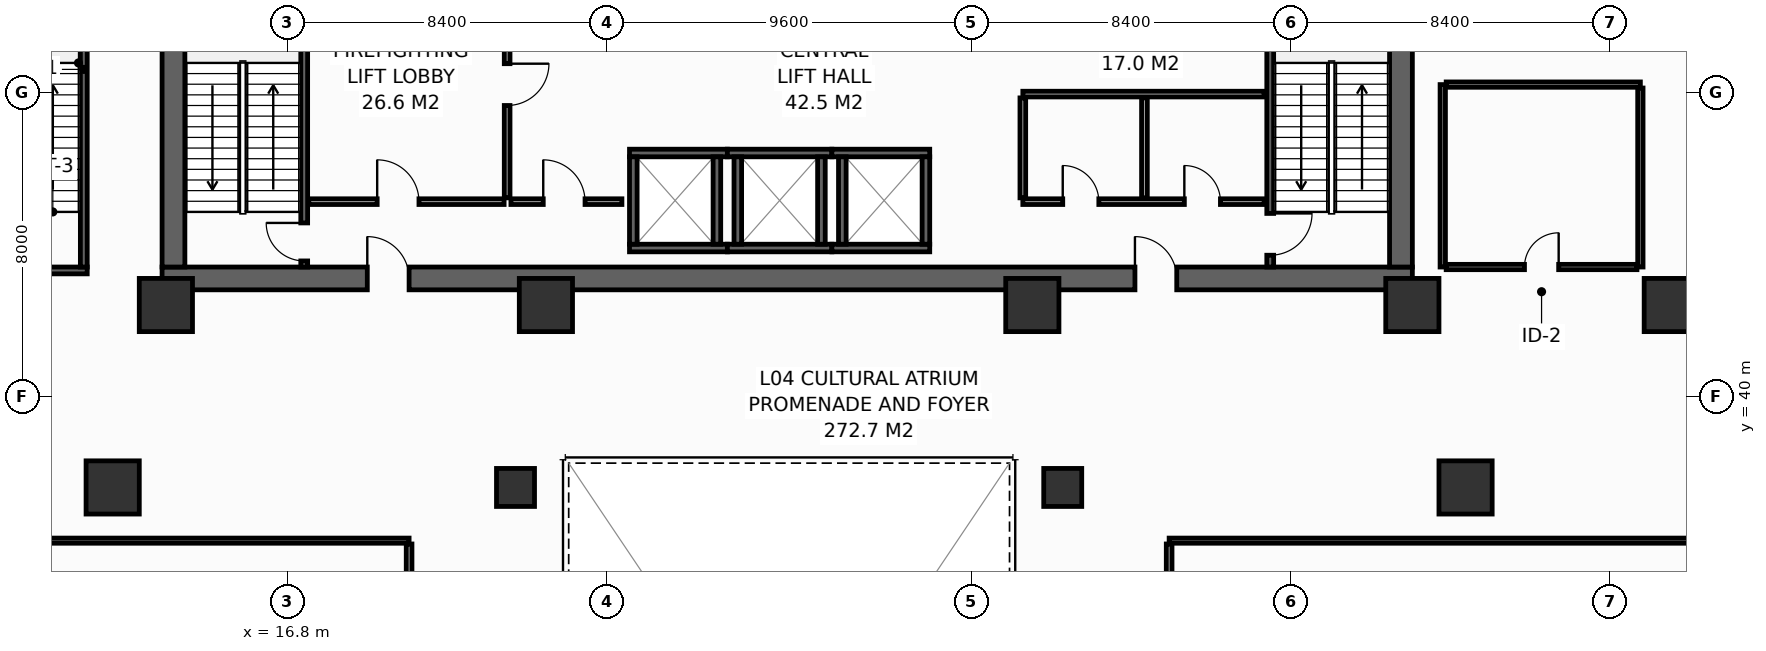
"""IFC4 building model, lengths in metres.
Left out: names, types, materials, properties, quantities, classifications, styles, units other than length and angle.
Written with IfcOpenShell. Run it as: python <this file> out.ifc"""

import sys

from ifc_helpers import new_model, si_unit, direction, frame, frame_2d, origin, origin_2d, place, context, subcontext, project, spatial, rectangle, hollow_rectangle, extrude, element, fill, save


model = new_model("IFC4")
c1 = context("Model", 3, precision=1e-05, world=origin(), true_north=direction((0.0, 1.0)))
c2 = subcontext(c1, "Body", "Model", "MODEL_VIEW")
j1 = project(units=[si_unit("LENGTHUNIT", "METRE"), si_unit("PLANEANGLEUNIT", "RADIAN")], contexts=[c1])
p1 = place(None, origin())
s1 = spatial("IfcSite", under=j1, at=p1, CompositionType="ELEMENT")
p2 = place(p1, origin())
s2 = spatial("IfcBuilding", under=s1, at=p2, CompositionType="ELEMENT")
p3 = place(p2, frame((0.0, 0.0, 22.2)))
s3 = spatial("IfcBuildingStorey", under=s2, at=p3, CompositionType="ELEMENT", Elevation=22.2)
p4 = place(p3, frame((13.5, 43.1, 0.0), z_axis=(0.0, 0.0, 1.0), x_axis=(1.0, 0.0, 0.0)))
e1 = element("IfcWall", 1, at=p4, inside=s3, PredefinedType="SHEAR", context=c2, shape_type="SweptSolid", body=[
    extrude(rectangle(XDim=32.9, YDim=0.6, at=frame_2d((16.45, 0.0))), origin(), (0.0, 0.0, 1.0), 5.15),
])
p5 = place(p4, frame((5.4, 0.0, 0.0)))
e2 = element("IfcOpeningElement", 2, at=p5, cuts=e1, PredefinedType="OPENING", context=c2, shape_type="SweptSolid", body=[
    extrude(rectangle(XDim=1.1, YDim=2.15, at=frame_2d((0.55, 1.075))), frame((0.0, 0.31, 0.0), z_axis=(0.0, -1.0, 0.0), x_axis=(1.0, 0.0, 0.0)), (0.0, 0.0, 1.0), 0.62),
])
p6 = place(p4, frame((25.6, 0.0, 0.0)))
e3 = element("IfcOpeningElement", 3, at=p6, cuts=e1, PredefinedType="OPENING", context=c2, shape_type="SweptSolid", body=[
    extrude(rectangle(XDim=1.1, YDim=2.15, at=frame_2d((0.55, 1.075))), frame((0.0, 0.31, 0.0), z_axis=(0.0, -1.0, 0.0), x_axis=(1.0, 0.0, 0.0)), (0.0, 0.0, 1.0), 0.62),
])
for number, where, z_axis, x_axis in (
    (4, (13.8, 43.4, 0.0), (0.0, 0.0, 1.0), (0.0, 1.0, 0.0)),
    (5, (46.1, 43.4, 0.0), (0.0, 0.0, 1.0), (0.0, 1.0, 0.0)),
):
    element("IfcWall", number, at=place(p3, frame(where, z_axis=z_axis, x_axis=x_axis)), inside=s3, PredefinedType="SHEAR", context=c2, shape_type="SweptSolid", body=[
        extrude(rectangle(XDim=10.4, YDim=0.6, at=frame_2d((5.2, 0.0))), origin(), (0.0, 0.0, 1.0), 5.15),
    ])
for number, where, z_axis, x_axis in (
    (6, (13.6, 42.4, 0.0), (0.0, 0.0, 1.0), (1.0, 0.0, 0.0)),
    (7, (23.6, 42.4, 0.0), (0.0, 0.0, 1.0), (1.0, 0.0, 0.0)),
    (8, (36.4, 42.4, 0.0), (0.0, 0.0, 1.0), (1.0, 0.0, 0.0)),
    (9, (46.4, 42.4, 0.0), (0.0, 0.0, 1.0), (1.0, 0.0, 0.0)),
    (10, (53.2, 42.4, 0.0), (0.0, 0.0, 1.0), (1.0, 0.0, 0.0)),
    (11, (12.2, 37.6, 0.0), (0.0, 0.0, 1.0), (1.0, 0.0, 0.0)),
):
    element("IfcColumn", number, at=place(p3, frame(where, z_axis=z_axis, x_axis=x_axis)), inside=s3, PredefinedType="COLUMN", context=c2, shape_type="SweptSolid", body=[
        extrude(hollow_rectangle(XDim=1.4, YDim=1.4, WallThickness=0.065, at=origin_2d()), origin(), (0.0, 0.0, 1.0), 5.4),
    ])
for number, where, z_axis, x_axis in (
    (12, (22.8, 37.6, 0.0), (0.0, 0.0, 1.0), (1.0, 0.0, 0.0)),
    (13, (37.2, 37.6, 0.0), (0.0, 0.0, 1.0), (1.0, 0.0, 0.0)),
):
    element("IfcColumn", number, at=place(p3, frame(where, z_axis=z_axis, x_axis=x_axis)), inside=s3, PredefinedType="COLUMN", context=c2, shape_type="SweptSolid", body=[
        extrude(hollow_rectangle(XDim=1.0, YDim=1.0, WallThickness=0.045, at=origin_2d()), origin(), (0.0, 0.0, 1.0), 5.4),
    ])
p7 = place(p3, frame((47.8, 37.6, 0.0), z_axis=(0.0, 0.0, 1.0), x_axis=(1.0, 0.0, 0.0)))
e14 = element("IfcColumn", 14, at=p7, inside=s3, PredefinedType="COLUMN", context=c2, shape_type="SweptSolid", body=[
    extrude(hollow_rectangle(XDim=1.4, YDim=1.4, WallThickness=0.065, at=origin_2d()), origin(), (0.0, 0.0, 1.0), 5.4),
])
for number, where, z_axis, x_axis in (
    (15, (25.8, 43.9, 0.0), (0.0, 0.0, 1.0), (1.0, 0.0, 0.0)),
    (16, (25.8, 46.4, 0.0), (0.0, 0.0, 1.0), (1.0, 0.0, 0.0)),
):
    element("IfcWall", number, at=place(p3, frame(where, z_axis=z_axis, x_axis=x_axis)), inside=s3, PredefinedType="SHEAR", context=c2, shape_type="SweptSolid", body=[
        extrude(rectangle(XDim=2.575, YDim=0.2, at=frame_2d((1.288, 0.0))), origin(), (0.0, 0.0, 1.0), 5.15),
    ])
for number, where, z_axis, x_axis in (
    (17, (25.9, 44.0, 0.0), (0.0, 0.0, 1.0), (0.0, 1.0, 0.0)),
    (18, (28.1, 44.0, 0.0), (0.0, 0.0, 1.0), (0.0, 1.0, 0.0)),
):
    element("IfcWall", number, at=place(p3, frame(where, z_axis=z_axis, x_axis=x_axis)), inside=s3, PredefinedType="SHEAR", context=c2, shape_type="SweptSolid", body=[
        extrude(rectangle(XDim=2.3, YDim=0.2, at=frame_2d((1.15, 0.0))), origin(), (0.0, 0.0, 1.0), 5.15),
    ])
for number, where, z_axis, x_axis in (
    (19, (28.375, 43.9, 0.0), (0.0, 0.0, 1.0), (1.0, 0.0, 0.0)),
    (20, (28.375, 46.4, 0.0), (0.0, 0.0, 1.0), (1.0, 0.0, 0.0)),
):
    element("IfcWall", number, at=place(p3, frame(where, z_axis=z_axis, x_axis=x_axis)), inside=s3, PredefinedType="SHEAR", context=c2, shape_type="SweptSolid", body=[
        extrude(rectangle(XDim=2.75, YDim=0.2, at=frame_2d((1.375, 0.0))), origin(), (0.0, 0.0, 1.0), 5.15),
    ])
for number, where, z_axis, x_axis in (
    (21, (28.65, 44.0, 0.0), (0.0, 0.0, 1.0), (0.0, 1.0, 0.0)),
    (22, (30.85, 44.0, 0.0), (0.0, 0.0, 1.0), (0.0, 1.0, 0.0)),
):
    element("IfcWall", number, at=place(p3, frame(where, z_axis=z_axis, x_axis=x_axis)), inside=s3, PredefinedType="SHEAR", context=c2, shape_type="SweptSolid", body=[
        extrude(rectangle(XDim=2.3, YDim=0.2, at=frame_2d((1.15, 0.0))), origin(), (0.0, 0.0, 1.0), 5.15),
    ])
for number, where, z_axis, x_axis in (
    (23, (31.125, 43.9, 0.0), (0.0, 0.0, 1.0), (1.0, 0.0, 0.0)),
    (24, (31.125, 46.4, 0.0), (0.0, 0.0, 1.0), (1.0, 0.0, 0.0)),
):
    element("IfcWall", number, at=place(p3, frame(where, z_axis=z_axis, x_axis=x_axis)), inside=s3, PredefinedType="SHEAR", context=c2, shape_type="SweptSolid", body=[
        extrude(rectangle(XDim=2.575, YDim=0.2, at=frame_2d((1.288, 0.0))), origin(), (0.0, 0.0, 1.0), 5.15),
    ])
for number, where, z_axis, x_axis in (
    (25, (31.4, 44.0, 0.0), (0.0, 0.0, 1.0), (0.0, 1.0, 0.0)),
    (26, (33.6, 44.0, 0.0), (0.0, 0.0, 1.0), (0.0, 1.0, 0.0)),
):
    element("IfcWall", number, at=place(p3, frame(where, z_axis=z_axis, x_axis=x_axis)), inside=s3, PredefinedType="SHEAR", context=c2, shape_type="SweptSolid", body=[
        extrude(rectangle(XDim=2.3, YDim=0.2, at=frame_2d((1.15, 0.0))), origin(), (0.0, 0.0, 1.0), 5.15),
    ])
p8 = place(p3, frame((17.24, 43.4, 0.0), z_axis=(0.0, 0.0, 1.0), x_axis=(0.0, 1.0, 0.0)))
e27 = element("IfcWall", 27, at=p8, inside=s3, PredefinedType="SHEAR", context=c2, shape_type="SweptSolid", body=[
    extrude(rectangle(XDim=10.4, YDim=0.18, at=frame_2d((5.2, 0.0))), origin(), (0.0, 0.0, 1.0), 5.15),
])
p9 = place(p8, frame((0.16, 0.0, 0.0)))
e28 = element("IfcOpeningElement", 28, at=p9, cuts=e27, PredefinedType="OPENING", context=c2, shape_type="SweptSolid", body=[
    extrude(rectangle(XDim=1.0, YDim=2.15, at=frame_2d((0.5, 1.075))), frame((0.0, 0.1, 0.0), z_axis=(0.0, -1.0, 0.0), x_axis=(1.0, 0.0, 0.0)), (0.0, 0.0, 1.0), 0.2),
])
p10 = place(p3, frame((42.66, 53.8, 0.0), z_axis=(0.0, 0.0, 1.0), x_axis=(0.0, -1.0, 0.0)))
e29 = element("IfcWall", 29, at=p10, inside=s3, PredefinedType="SHEAR", context=c2, shape_type="SweptSolid", body=[
    extrude(rectangle(XDim=10.4, YDim=0.18, at=frame_2d((5.2, 0.0))), origin(), (0.0, 0.0, 1.0), 5.15),
])
p11 = place(p10, frame((8.99, 0.0, 0.0)))
e30 = element("IfcOpeningElement", 30, at=p11, cuts=e29, PredefinedType="OPENING", context=c2, shape_type="SweptSolid", body=[
    extrude(rectangle(XDim=1.1, YDim=2.15, at=frame_2d((0.55, 1.075))), frame((0.0, 0.1, 0.0), z_axis=(0.0, -1.0, 0.0), x_axis=(1.0, 0.0, 0.0)), (0.0, 0.0, 1.0), 0.2),
])
p12 = place(p3, frame((8.12, 43.31, 0.0), z_axis=(0.0, 0.0, 1.0), x_axis=(1.0, 0.0, 0.0)))
e31 = element("IfcWall", 31, at=p12, inside=s3, PredefinedType="SHEAR", context=c2, shape_type="SweptSolid", body=[
    extrude(rectangle(XDim=3.41, YDim=0.18, at=frame_2d((1.705, 0.0))), origin(), (0.0, 0.0, 1.0), 5.15),
])
p13 = place(p12, frame((1.15, 0.0, 0.0)))
e32 = element("IfcOpeningElement", 32, at=p13, cuts=e31, PredefinedType="OPENING", context=c2, shape_type="SweptSolid", body=[
    extrude(rectangle(XDim=1.1, YDim=2.15, at=frame_2d((0.55, 1.075))), frame((0.0, 0.1, 0.0), z_axis=(0.0, -1.0, 0.0), x_axis=(1.0, 0.0, 0.0)), (0.0, 0.0, 1.0), 0.2),
])
p14 = place(p3, frame((11.44, 43.4, 0.0), z_axis=(0.0, 0.0, 1.0), x_axis=(0.0, 1.0, 0.0)))
e33 = element("IfcWall", 33, at=p14, inside=s3, PredefinedType="SHEAR", context=c2, shape_type="SweptSolid", body=[
    extrude(rectangle(XDim=10.4, YDim=0.18, at=frame_2d((5.2, 0.0))), origin(), (0.0, 0.0, 1.0), 5.15),
])
p15 = place(p3, frame((17.36, 45.12, 0.0), z_axis=(0.0, 0.0, 1.0), x_axis=(1.0, 0.0, 0.0)))
e34 = element("IfcWall", 34, at=p15, inside=s3, PredefinedType="PARTITIONING", context=c2, shape_type="SweptSolid", body=[
    extrude(rectangle(XDim=5.14, YDim=0.15, at=frame_2d((2.57, 0.0))), origin(), (0.0, 0.0, 1.0), 5.15),
])
p16 = place(p15, frame((1.8, 0.0, 0.0)))
e35 = element("IfcOpeningElement", 35, at=p16, cuts=e34, PredefinedType="OPENING", context=c2, shape_type="SweptSolid", body=[
    extrude(rectangle(XDim=1.1, YDim=2.15, at=frame_2d((0.55, 1.075))), frame((0.0, 0.085, 0.0), z_axis=(0.0, -1.0, 0.0), x_axis=(1.0, 0.0, 0.0)), (0.0, 0.0, 1.0), 0.17),
])
p17 = place(p3, frame((22.58, 50.55, 0.0), z_axis=(0.0, 0.0, 1.0), x_axis=(0.0, -1.0, 0.0)))
e36 = element("IfcWall", 36, at=p17, inside=s3, PredefinedType="PARTITIONING", context=c2, shape_type="SweptSolid", body=[
    extrude(rectangle(XDim=5.33, YDim=0.15, at=frame_2d((2.665, 0.0))), origin(), (0.0, 0.0, 1.0), 5.15),
])
p18 = place(p17, frame((1.8, 0.0, 0.0)))
e37 = element("IfcOpeningElement", 37, at=p18, cuts=e36, PredefinedType="OPENING", context=c2, shape_type="SweptSolid", body=[
    extrude(rectangle(XDim=1.1, YDim=2.15, at=frame_2d((0.55, 1.075))), frame((0.0, 0.085, 0.0), z_axis=(0.0, -1.0, 0.0), x_axis=(1.0, 0.0, 0.0)), (0.0, 0.0, 1.0), 0.17),
])
p19 = place(p3, frame((22.68, 45.12, 0.0), z_axis=(0.0, 0.0, 1.0), x_axis=(1.0, 0.0, 0.0)))
e38 = element("IfcWall", 38, at=p19, inside=s3, PredefinedType="PARTITIONING", context=c2, shape_type="SweptSolid", body=[
    extrude(rectangle(XDim=2.92, YDim=0.15, at=frame_2d((1.46, 0.0))), origin(), (0.0, 0.0, 1.0), 5.15),
])
p20 = place(p19, frame((0.85, 0.0, 0.0)))
e39 = element("IfcOpeningElement", 39, at=p20, cuts=e38, PredefinedType="OPENING", context=c2, shape_type="SweptSolid", body=[
    extrude(rectangle(XDim=1.1, YDim=2.15, at=frame_2d((0.55, 1.075))), frame((0.0, 0.085, 0.0), z_axis=(0.0, -1.0, 0.0), x_axis=(1.0, 0.0, 0.0)), (0.0, 0.0, 1.0), 0.17),
])
p21 = place(p3, frame((36.15, 45.12, 0.0), z_axis=(0.0, 0.0, 1.0), x_axis=(1.0, 0.0, 0.0)))
e40 = element("IfcWall", 40, at=p21, inside=s3, PredefinedType="PARTITIONING", context=c2, shape_type="SweptSolid", body=[
    extrude(rectangle(XDim=6.35, YDim=0.15, at=frame_2d((3.175, 0.0))), origin(), (0.0, 0.0, 1.0), 5.15),
])
p22 = place(p21, frame((1.05, 0.0, 0.0)))
e41 = element("IfcOpeningElement", 41, at=p22, cuts=e40, PredefinedType="OPENING", context=c2, shape_type="SweptSolid", body=[
    extrude(rectangle(XDim=0.95, YDim=2.15, at=frame_2d((0.475, 1.075))), frame((0.0, 0.085, 0.0), z_axis=(0.0, -1.0, 0.0), x_axis=(1.0, 0.0, 0.0)), (0.0, 0.0, 1.0), 0.17),
])
p23 = place(p21, frame((4.25, 0.0, 0.0)))
e42 = element("IfcOpeningElement", 42, at=p23, cuts=e40, PredefinedType="OPENING", context=c2, shape_type="SweptSolid", body=[
    extrude(rectangle(XDim=0.95, YDim=2.15, at=frame_2d((0.475, 1.075))), frame((0.0, 0.085, 0.0), z_axis=(0.0, -1.0, 0.0), x_axis=(1.0, 0.0, 0.0)), (0.0, 0.0, 1.0), 0.17),
])
p24 = place(p3, frame((36.15, 47.95, 0.0), z_axis=(0.0, 0.0, 1.0), x_axis=(1.0, 0.0, 0.0)))
e43 = element("IfcWall", 43, at=p24, inside=s3, PredefinedType="PARTITIONING", context=c2, shape_type="SweptSolid", body=[
    extrude(rectangle(XDim=6.35, YDim=0.15, at=frame_2d((3.175, 0.0))), origin(), (0.0, 0.0, 1.0), 5.15),
])
for number, where, z_axis, x_axis in (
    (44, (36.15, 45.22, 0.0), (0.0, 0.0, 1.0), (0.0, 1.0, 0.0)),
    (45, (39.35, 45.22, 0.0), (0.0, 0.0, 1.0), (0.0, 1.0, 0.0)),
):
    element("IfcWall", number, at=place(p3, frame(where, z_axis=z_axis, x_axis=x_axis)), inside=s3, PredefinedType="PARTITIONING", context=c2, shape_type="SweptSolid", body=[
        extrude(rectangle(XDim=2.63, YDim=0.15, at=frame_2d((1.315, 0.0))), origin(), (0.0, 0.0, 1.0), 5.15),
    ])
p25 = place(p3, frame((2.295, 36.2, 0.0), z_axis=(0.0, 0.0, 1.0), x_axis=(1.0, 0.0, 0.0)))
e46 = element("IfcWall", 46, at=p25, inside=s3, PredefinedType="PARTITIONING", context=c2, shape_type="SweptSolid", body=[
    extrude(rectangle(XDim=17.705, YDim=0.135, at=frame_2d((8.853, 0.0))), origin(), (0.0, 0.0, 1.0), 4.235),
])
p26 = place(p3, frame((20.0, 27.288, 0.0), z_axis=(0.0, 0.0, 1.0), x_axis=(0.0, 1.0, 0.0)))
e47 = element("IfcWall", 47, at=p26, inside=s3, PredefinedType="PARTITIONING", context=c2, shape_type="SweptSolid", body=[
    extrude(rectangle(XDim=8.825, YDim=0.15, at=frame_2d((4.413, 0.0))), origin(), (0.0, 0.0, 1.0), 4.235),
])
p27 = place(p26, frame((3.887, 0.0, 0.0)))
e48 = element("IfcOpeningElement", 48, at=p27, cuts=e47, PredefinedType="OPENING", context=c2, shape_type="SweptSolid", body=[
    extrude(rectangle(XDim=1.05, YDim=2.15, at=frame_2d((0.525, 1.075))), frame((0.0, 0.085, 0.0), z_axis=(0.0, -1.0, 0.0), x_axis=(1.0, 0.0, 0.0)), (0.0, 0.0, 1.0), 0.17),
])
p28 = place(p3, frame((40.0, 36.2, 0.0), z_axis=(0.0, 0.0, 1.0), x_axis=(1.0, 0.0, 0.0)))
e49 = element("IfcWall", 49, at=p28, inside=s3, PredefinedType="PARTITIONING", context=c2, shape_type="SweptSolid", body=[
    extrude(rectangle(XDim=17.705, YDim=0.135, at=frame_2d((8.853, 0.0))), origin(), (0.0, 0.0, 1.0), 4.235),
])
p29 = place(p3, frame((40.0, 26.488, 0.0), z_axis=(0.0, 0.0, 1.0), x_axis=(0.0, 1.0, 0.0)))
e50 = element("IfcWall", 50, at=p29, inside=s3, PredefinedType="PARTITIONING", context=c2, shape_type="SweptSolid", body=[
    extrude(rectangle(XDim=9.625, YDim=0.15, at=frame_2d((4.812, 0.0))), origin(), (0.0, 0.0, 1.0), 4.235),
])
p30 = place(p29, frame((4.287, 0.0, 0.0)))
e51 = element("IfcOpeningElement", 51, at=p30, cuts=e50, PredefinedType="OPENING", context=c2, shape_type="SweptSolid", body=[
    extrude(rectangle(XDim=1.05, YDim=2.15, at=frame_2d((0.525, 1.075))), frame((0.0, 0.085, 0.0), z_axis=(0.0, -1.0, 0.0), x_axis=(1.0, 0.0, 0.0)), (0.0, 0.0, 1.0), 0.17),
])
p31 = place(p3, frame((47.2, 43.4, 0.0), z_axis=(0.0, 0.0, 1.0), x_axis=(0.0, 1.0, 0.0)))
e52 = element("IfcWall", 52, at=p31, inside=s3, PredefinedType="PARTITIONING", context=c2, shape_type="SweptSolid", body=[
    extrude(rectangle(XDim=4.8, YDim=0.14, at=frame_2d((2.4, 0.0))), origin(), (0.0, 0.0, 1.0), 5.15),
])
p32 = place(p3, frame((47.29, 48.2, 0.0), z_axis=(0.0, 0.0, 1.0), x_axis=(1.0, 0.0, 0.0)))
e53 = element("IfcWall", 53, at=p32, inside=s3, PredefinedType="PARTITIONING", context=c2, shape_type="SweptSolid", body=[
    extrude(rectangle(XDim=5.11, YDim=0.14, at=frame_2d((2.555, 0.0))), origin(), (0.0, 0.0, 1.0), 5.15),
])
p33 = place(p3, frame((52.4, 43.4, 0.0), z_axis=(0.0, 0.0, 1.0), x_axis=(0.0, 1.0, 0.0)))
e54 = element("IfcWall", 54, at=p33, inside=s3, PredefinedType="PARTITIONING", context=c2, shape_type="SweptSolid", body=[
    extrude(rectangle(XDim=4.71, YDim=0.14, at=frame_2d((2.355, 0.0))), origin(), (0.0, 0.0, 1.0), 5.15),
])
p34 = place(p3, frame((47.29, 43.4, 0.0), z_axis=(0.0, 0.0, 1.0), x_axis=(1.0, 0.0, 0.0)))
e55 = element("IfcWall", 55, at=p34, inside=s3, PredefinedType="PARTITIONING", context=c2, shape_type="SweptSolid", body=[
    extrude(rectangle(XDim=5.02, YDim=0.14, at=frame_2d((2.51, 0.0))), origin(), (0.0, 0.0, 1.0), 5.15),
])
p35 = place(p34, frame((2.06, 0.0, 0.0)))
e56 = element("IfcOpeningElement", 56, at=p35, cuts=e55, PredefinedType="OPENING", context=c2, shape_type="SweptSolid", body=[
    extrude(rectangle(XDim=0.9, YDim=2.1, at=frame_2d((0.45, 1.05))), frame((0.0, 0.08, 0.0), z_axis=(0.0, -1.0, 0.0), x_axis=(1.0, 0.0, 0.0)), (0.0, 0.0, 1.0), 0.16),
])
p36 = place(p9, origin())
e57 = element("IfcDoor", 57, at=p36, inside=s3, OperationType="SINGLE_SWING_RIGHT", PredefinedType="DOOR", context=c2, shape_type="SweptSolid", body=[
    extrude(rectangle(XDim=1.0, YDim=2.15, at=frame_2d((0.5, 1.075))), frame((0.0, 0.025, 0.0), z_axis=(0.0, -1.0, 0.0), x_axis=(1.0, 0.0, 0.0)), (0.0, 0.0, 1.0), 0.05),
])
fill(e28, e57)
p37 = place(p11, origin())
e58 = element("IfcDoor", 58, at=p37, inside=s3, OperationType="SINGLE_SWING_LEFT", PredefinedType="DOOR", context=c2, shape_type="SweptSolid", body=[
    extrude(rectangle(XDim=1.1, YDim=2.15, at=frame_2d((0.55, 1.075))), frame((0.0, 0.025, 0.0), z_axis=(0.0, -1.0, 0.0), x_axis=(1.0, 0.0, 0.0)), (0.0, 0.0, 1.0), 0.05),
])
fill(e30, e58)
p38 = place(p16, origin())
e59 = element("IfcDoor", 59, at=p38, inside=s3, OperationType="SINGLE_SWING_LEFT", PredefinedType="DOOR", context=c2, shape_type="SweptSolid", body=[
    extrude(rectangle(XDim=1.1, YDim=2.15, at=frame_2d((0.55, 1.075))), frame((0.0, 0.025, 0.0), z_axis=(0.0, -1.0, 0.0), x_axis=(1.0, 0.0, 0.0)), (0.0, 0.0, 1.0), 0.05),
])
fill(e35, e59)
p39 = place(p18, origin())
e60 = element("IfcDoor", 60, at=p39, inside=s3, OperationType="SINGLE_SWING_LEFT", PredefinedType="DOOR", context=c2, shape_type="SweptSolid", body=[
    extrude(rectangle(XDim=1.1, YDim=2.15, at=frame_2d((0.55, 1.075))), frame((0.0, 0.025, 0.0), z_axis=(0.0, -1.0, 0.0), x_axis=(1.0, 0.0, 0.0)), (0.0, 0.0, 1.0), 0.05),
])
fill(e37, e60)
p40 = place(p20, origin())
e61 = element("IfcDoor", 61, at=p40, inside=s3, OperationType="SINGLE_SWING_LEFT", PredefinedType="DOOR", context=c2, shape_type="SweptSolid", body=[
    extrude(rectangle(XDim=1.1, YDim=2.15, at=frame_2d((0.55, 1.075))), frame((0.0, 0.025, 0.0), z_axis=(0.0, -1.0, 0.0), x_axis=(1.0, 0.0, 0.0)), (0.0, 0.0, 1.0), 0.05),
])
fill(e39, e61)
p41 = place(p5, origin())
e62 = element("IfcDoor", 62, at=p41, inside=s3, OperationType="SINGLE_SWING_LEFT", PredefinedType="DOOR", context=c2, shape_type="SweptSolid", body=[
    extrude(rectangle(XDim=1.1, YDim=2.15, at=frame_2d((0.55, 1.075))), frame((0.0, 0.025, 0.0), z_axis=(0.0, -1.0, 0.0), x_axis=(1.0, 0.0, 0.0)), (0.0, 0.0, 1.0), 0.05),
])
fill(e2, e62)
p42 = place(p6, origin())
e63 = element("IfcDoor", 63, at=p42, inside=s3, OperationType="SINGLE_SWING_LEFT", PredefinedType="DOOR", context=c2, shape_type="SweptSolid", body=[
    extrude(rectangle(XDim=1.1, YDim=2.15, at=frame_2d((0.55, 1.075))), frame((0.0, 0.025, 0.0), z_axis=(0.0, -1.0, 0.0), x_axis=(1.0, 0.0, 0.0)), (0.0, 0.0, 1.0), 0.05),
])
fill(e3, e63)
p43 = place(p22, origin())
e64 = element("IfcDoor", 64, at=p43, inside=s3, OperationType="SINGLE_SWING_LEFT", PredefinedType="DOOR", context=c2, shape_type="SweptSolid", body=[
    extrude(rectangle(XDim=0.95, YDim=2.15, at=frame_2d((0.475, 1.075))), frame((0.0, 0.025, 0.0), z_axis=(0.0, -1.0, 0.0), x_axis=(1.0, 0.0, 0.0)), (0.0, 0.0, 1.0), 0.05),
])
fill(e41, e64)
p44 = place(p23, origin())
e65 = element("IfcDoor", 65, at=p44, inside=s3, OperationType="SINGLE_SWING_LEFT", PredefinedType="DOOR", context=c2, shape_type="SweptSolid", body=[
    extrude(rectangle(XDim=0.95, YDim=2.15, at=frame_2d((0.475, 1.075))), frame((0.0, 0.025, 0.0), z_axis=(0.0, -1.0, 0.0), x_axis=(1.0, 0.0, 0.0)), (0.0, 0.0, 1.0), 0.05),
])
fill(e42, e65)
p45 = place(p35, origin())
e66 = element("IfcDoor", 66, at=p45, inside=s3, OperationType="SINGLE_SWING_RIGHT", PredefinedType="DOOR", context=c2, shape_type="SweptSolid", body=[
    extrude(rectangle(XDim=0.9, YDim=2.1, at=frame_2d((0.45, 1.05))), frame((0.0, 0.025, 0.0), z_axis=(0.0, -1.0, 0.0), x_axis=(1.0, 0.0, 0.0)), (0.0, 0.0, 1.0), 0.05),
])
fill(e56, e66)
save(model, sys.argv[1])
